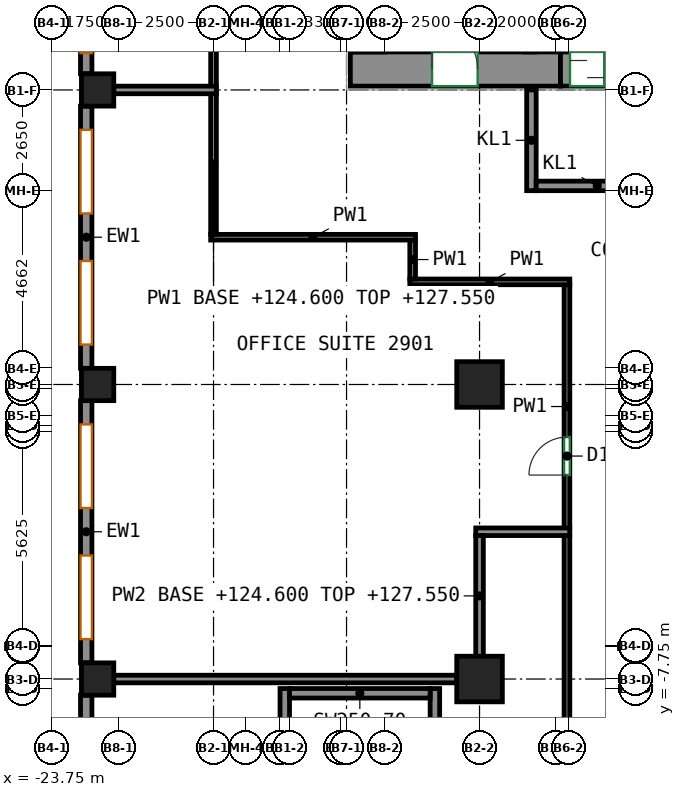
"""IFC4 building model, lengths in metres.
Left out: names, types, materials, properties, quantities, classifications, styles, units other than length and angle.
Written with IfcOpenShell. Run it as: python <this file> out.ifc"""

import sys

from ifc_helpers import new_model, si_unit, direction, frame, frame_2d, origin, origin_2d, place, context, subcontext, project, spatial, rectangle, extrude, source, transform, mapped, element, fill, save


model = new_model("IFC4")
c1 = context("Model", 3, precision=1e-05, world=origin(), true_north=direction((0.0, 1.0)))
c2 = subcontext(c1, "Body", "Model", "MODEL_VIEW")
j1 = project(units=[si_unit("LENGTHUNIT", "METRE"), si_unit("PLANEANGLEUNIT", "RADIAN")], contexts=[c1])
p1 = place(None, origin())
s1 = spatial("IfcSite", under=j1, at=p1, CompositionType="ELEMENT")
p2 = place(p1, origin())
s2 = spatial("IfcBuilding", under=s1, at=p2, CompositionType="ELEMENT")
p3 = place(p2, frame((0.0, 0.0, 124.6)))
s3 = spatial("IfcBuildingStorey", under=s2, at=p3, CompositionType="ELEMENT", Elevation=124.6)
m1 = source(origin(), c2, "Body", "SweptSolid", [
    extrude(rectangle(XDim=0.85, YDim=0.85, at=origin_2d()), origin(), (0.0, 0.0, 1.0), 3.6),
])
for number, where, z_axis, x_axis in (
    (1, (-22.55, -7.5, 0.0), (0.0, 0.0, 1.0), (1.0, 0.0, 0.0)),
    (2, (-22.55, 0.25, 0.0), (0.0, 0.0, 1.0), (1.0, 0.0, 0.0)),
    (3, (-22.55, 8.0, 0.0), (0.0, 0.0, 1.0), (1.0, 0.0, 0.0)),
):
    element("IfcColumn", number, at=place(p3, frame(where, z_axis=z_axis, x_axis=x_axis)), inside=s3, PredefinedType="COLUMN", context=c2, shape_type="MappedRepresentation", body=[
        mapped(m1, transform((0.0, 0.0, 0.0))),
    ])
m2 = source(origin(), c2, "Body", "SweptSolid", [
    extrude(rectangle(XDim=1.2, YDim=1.2, at=origin_2d()), origin(), (0.0, 0.0, 1.0), 3.6),
])
for number, where, z_axis, x_axis in (
    (4, (-12.5, -7.5, 0.0), (0.0, 0.0, 1.0), (1.0, 0.0, 0.0)),
    (5, (-12.5, 0.25, 0.0), (0.0, 0.0, 1.0), (1.0, 0.0, 0.0)),
):
    element("IfcColumn", number, at=place(p3, frame(where, z_axis=z_axis, x_axis=x_axis)), inside=s3, PredefinedType="COLUMN", context=c2, shape_type="MappedRepresentation", body=[
        mapped(m2, transform((0.0, 0.0, 0.0))),
    ])
m3 = source(origin(), c2, "Body", "SweptSolid", [
    extrude(rectangle(XDim=5.53, YDim=0.9, at=frame_2d((2.765, 0.0))), origin(), (0.0, 0.0, 1.0), 3.6),
])
p4 = place(p3, frame((-15.9, 8.55, 0.0), z_axis=(0.0, 0.0, 1.0), x_axis=(1.0, 0.0, 0.0)))
e6 = element("IfcWall", 6, at=p4, inside=s3, PredefinedType="SHEAR", context=c2, shape_type="MappedRepresentation", body=[
    mapped(m3, transform((0.0, 0.0, 0.0))),
])
p5 = place(p4, frame((2.15, 0.0, 0.0)))
e7 = element("IfcOpeningElement", 7, at=p5, cuts=e6, PredefinedType="OPENING", context=c2, shape_type="SweptSolid", body=[
    extrude(rectangle(XDim=1.2, YDim=2.1, at=frame_2d((0.6, 1.05))), frame((0.0, 0.46, 0.0), z_axis=(0.0, -1.0, 0.0), x_axis=(1.0, 0.0, 0.0)), (0.0, 0.0, 1.0), 0.92),
])
m4 = source(origin(), c2, "Body", "SweptSolid", [
    extrude(rectangle(XDim=8.0, YDim=0.25, at=frame_2d((4.0, 0.0))), origin(), (0.0, 0.0, 1.0), 3.6),
])
for number, where, z_axis, x_axis in (
    (8, (-17.625, -15.75, 0.0), (0.0, 0.0, 1.0), (0.0, 1.0, 0.0)),
    (9, (-13.675, -15.75, 0.0), (0.0, 0.0, 1.0), (0.0, 1.0, 0.0)),
):
    element("IfcWall", number, at=place(p3, frame(where, z_axis=z_axis, x_axis=x_axis)), inside=s3, PredefinedType="SHEAR", context=c2, shape_type="MappedRepresentation", body=[
        mapped(m4, transform((0.0, 0.0, 0.0))),
    ])
m5 = source(origin(), c2, "Body", "SweptSolid", [
    extrude(rectangle(XDim=3.7, YDim=0.25, at=frame_2d((1.85, 0.0))), origin(), (0.0, 0.0, 1.0), 3.6),
])
p6 = place(p3, frame((-17.5, -7.875, 0.0), z_axis=(0.0, 0.0, 1.0), x_axis=(1.0, 0.0, 0.0)))
e10 = element("IfcWall", 10, at=p6, inside=s3, PredefinedType="SHEAR", context=c2, shape_type="MappedRepresentation", body=[
    mapped(m5, transform((0.0, 0.0, 0.0))),
])
m6 = source(origin(), c2, "Body", "SweptSolid", [
    extrude(rectangle(XDim=13.15, YDim=0.3, at=frame_2d((6.575, 0.0))), origin(), (0.0, 0.0, 1.0), 3.6),
])
p7 = place(p3, frame((-22.85, 21.575, 0.0), z_axis=(0.0, 0.0, 1.0), x_axis=(0.0, -1.0, 0.0)))
e11 = element("IfcWall", 11, at=p7, inside=s3, PredefinedType="SOLIDWALL", context=c2, shape_type="MappedRepresentation", body=[
    mapped(m6, transform((0.0, 0.0, 0.0))),
])
p8 = place(p7, frame((0.544, 0.0, 0.7)))
e12 = element("IfcOpeningElement", 12, at=p8, cuts=e11, PredefinedType="OPENING", context=c2, shape_type="SweptSolid", body=[
    extrude(rectangle(XDim=2.2, YDim=2.25, at=frame_2d((1.1, 1.125))), frame((0.0, 0.16, 0.0), z_axis=(0.0, -1.0, 0.0), x_axis=(1.0, 0.0, 0.0)), (0.0, 0.0, 1.0), 0.32),
])
p9 = place(p7, frame((3.831, 0.0, 0.7)))
e13 = element("IfcOpeningElement", 13, at=p9, cuts=e11, PredefinedType="OPENING", context=c2, shape_type="SweptSolid", body=[
    extrude(rectangle(XDim=2.2, YDim=2.25, at=frame_2d((1.1, 1.125))), frame((0.0, 0.16, 0.0), z_axis=(0.0, -1.0, 0.0), x_axis=(1.0, 0.0, 0.0)), (0.0, 0.0, 1.0), 0.32),
])
p10 = place(p7, frame((7.119, 0.0, 0.7)))
e14 = element("IfcOpeningElement", 14, at=p10, cuts=e11, PredefinedType="OPENING", context=c2, shape_type="SweptSolid", body=[
    extrude(rectangle(XDim=2.2, YDim=2.25, at=frame_2d((1.1, 1.125))), frame((0.0, 0.16, 0.0), z_axis=(0.0, -1.0, 0.0), x_axis=(1.0, 0.0, 0.0)), (0.0, 0.0, 1.0), 0.32),
])
p11 = place(p7, frame((10.406, 0.0, 0.7)))
e15 = element("IfcOpeningElement", 15, at=p11, cuts=e11, PredefinedType="OPENING", context=c2, shape_type="SweptSolid", body=[
    extrude(rectangle(XDim=2.2, YDim=2.25, at=frame_2d((1.1, 1.125))), frame((0.0, 0.16, 0.0), z_axis=(0.0, -1.0, 0.0), x_axis=(1.0, 0.0, 0.0)), (0.0, 0.0, 1.0), 0.32),
])
m7 = source(origin(), c2, "Body", "SweptSolid", [
    extrude(rectangle(XDim=6.9, YDim=0.3, at=frame_2d((3.45, 0.0))), origin(), (0.0, 0.0, 1.0), 3.6),
])
p12 = place(p3, frame((-22.85, 7.575, 0.0), z_axis=(0.0, 0.0, 1.0), x_axis=(0.0, -1.0, 0.0)))
e16 = element("IfcWall", 16, at=p12, inside=s3, PredefinedType="SOLIDWALL", context=c2, shape_type="MappedRepresentation", body=[
    mapped(m7, transform((0.0, 0.0, 0.0))),
])
p13 = place(p12, frame((0.625, 0.0, 0.7)))
e17 = element("IfcOpeningElement", 17, at=p13, cuts=e16, PredefinedType="OPENING", context=c2, shape_type="SweptSolid", body=[
    extrude(rectangle(XDim=2.2, YDim=2.25, at=frame_2d((1.1, 1.125))), frame((0.0, 0.16, 0.0), z_axis=(0.0, -1.0, 0.0), x_axis=(1.0, 0.0, 0.0)), (0.0, 0.0, 1.0), 0.32),
])
p14 = place(p12, frame((4.075, 0.0, 0.7)))
e18 = element("IfcOpeningElement", 18, at=p14, cuts=e16, PredefinedType="OPENING", context=c2, shape_type="SweptSolid", body=[
    extrude(rectangle(XDim=2.2, YDim=2.25, at=frame_2d((1.1, 1.125))), frame((0.0, 0.16, 0.0), z_axis=(0.0, -1.0, 0.0), x_axis=(1.0, 0.0, 0.0)), (0.0, 0.0, 1.0), 0.32),
])
p15 = place(p3, frame((-22.85, -0.175, 0.0), z_axis=(0.0, 0.0, 1.0), x_axis=(0.0, -1.0, 0.0)))
e19 = element("IfcWall", 19, at=p15, inside=s3, PredefinedType="SOLIDWALL", context=c2, shape_type="MappedRepresentation", body=[
    mapped(m7, transform((0.0, 0.0, 0.0))),
])
p16 = place(p15, frame((0.625, 0.0, 0.7)))
e20 = element("IfcOpeningElement", 20, at=p16, cuts=e19, PredefinedType="OPENING", context=c2, shape_type="SweptSolid", body=[
    extrude(rectangle(XDim=2.2, YDim=2.25, at=frame_2d((1.1, 1.125))), frame((0.0, 0.16, 0.0), z_axis=(0.0, -1.0, 0.0), x_axis=(1.0, 0.0, 0.0)), (0.0, 0.0, 1.0), 0.32),
])
p17 = place(p15, frame((4.075, 0.0, 0.7)))
e21 = element("IfcOpeningElement", 21, at=p17, cuts=e19, PredefinedType="OPENING", context=c2, shape_type="SweptSolid", body=[
    extrude(rectangle(XDim=2.2, YDim=2.25, at=frame_2d((1.1, 1.125))), frame((0.0, 0.16, 0.0), z_axis=(0.0, -1.0, 0.0), x_axis=(1.0, 0.0, 0.0)), (0.0, 0.0, 1.0), 0.32),
])
m8 = source(origin(), c2, "Body", "SweptSolid", [
    extrude(rectangle(XDim=11.15, YDim=0.3, at=frame_2d((5.575, 0.0))), origin(), (0.0, 0.0, 1.0), 3.6),
])
p18 = place(p3, frame((-22.85, -7.925, 0.0), z_axis=(0.0, 0.0, 1.0), x_axis=(0.0, -1.0, 0.0)))
e22 = element("IfcWall", 22, at=p18, inside=s3, PredefinedType="SOLIDWALL", context=c2, shape_type="MappedRepresentation", body=[
    mapped(m8, transform((0.0, 0.0, 0.0))),
])
p19 = place(p18, frame((0.758, 0.0, 0.7)))
e23 = element("IfcOpeningElement", 23, at=p19, cuts=e22, PredefinedType="OPENING", context=c2, shape_type="SweptSolid", body=[
    extrude(rectangle(XDim=2.2, YDim=2.25, at=frame_2d((1.1, 1.125))), frame((0.0, 0.16, 0.0), z_axis=(0.0, -1.0, 0.0), x_axis=(1.0, 0.0, 0.0)), (0.0, 0.0, 1.0), 0.32),
])
p20 = place(p18, frame((4.475, 0.0, 0.7)))
e24 = element("IfcOpeningElement", 24, at=p20, cuts=e22, PredefinedType="OPENING", context=c2, shape_type="SweptSolid", body=[
    extrude(rectangle(XDim=2.2, YDim=2.25, at=frame_2d((1.1, 1.125))), frame((0.0, 0.16, 0.0), z_axis=(0.0, -1.0, 0.0), x_axis=(1.0, 0.0, 0.0)), (0.0, 0.0, 1.0), 0.32),
])
p21 = place(p18, frame((8.192, 0.0, 0.7)))
e25 = element("IfcOpeningElement", 25, at=p21, cuts=e22, PredefinedType="OPENING", context=c2, shape_type="SweptSolid", body=[
    extrude(rectangle(XDim=2.2, YDim=2.25, at=frame_2d((1.1, 1.125))), frame((0.0, 0.16, 0.0), z_axis=(0.0, -1.0, 0.0), x_axis=(1.0, 0.0, 0.0)), (0.0, 0.0, 1.0), 0.32),
])
m9 = source(origin(), c2, "Body", "SweptSolid", [
    extrude(rectangle(XDim=2.65, YDim=0.25, at=frame_2d((1.325, 0.0))), origin(), (0.0, 0.0, 1.0), 3.6),
])
p22 = place(p3, frame((-11.135, 5.35, 0.0), z_axis=(0.0, 0.0, 1.0), x_axis=(0.0, 1.0, 0.0)))
e26 = element("IfcWall", 26, at=p22, inside=s3, PredefinedType="PARTITIONING", context=c2, shape_type="MappedRepresentation", body=[
    mapped(m9, transform((0.0, 0.0, 0.0))),
])
m10 = source(origin(), c2, "Body", "SweptSolid", [
    extrude(rectangle(XDim=5.36, YDim=0.25, at=frame_2d((2.68, 0.0))), origin(), (0.0, 0.0, 1.0), 3.6),
])
p23 = place(p3, frame((-11.01, 5.475, 0.0), z_axis=(0.0, 0.0, 1.0), x_axis=(1.0, 0.0, 0.0)))
e27 = element("IfcWall", 27, at=p23, inside=s3, PredefinedType="PARTITIONING", context=c2, shape_type="MappedRepresentation", body=[
    mapped(m10, transform((0.0, 0.0, 0.0))),
])
p24 = place(p23, frame((2.28, 0.0, 0.0)))
e28 = element("IfcOpeningElement", 28, at=p24, cuts=e27, PredefinedType="OPENING", context=c2, shape_type="SweptSolid", body=[
    extrude(rectangle(XDim=0.8, YDim=2.0, at=frame_2d((0.4, 1.0))), frame((0.0, 0.135, 0.0), z_axis=(0.0, -1.0, 0.0), x_axis=(1.0, 0.0, 0.0)), (0.0, 0.0, 1.0), 0.27),
])
m11 = source(origin(), c2, "Body", "SweptSolid", [
    extrude(rectangle(XDim=1.4, YDim=0.9, at=frame_2d((0.7, 0.0))), origin(), (0.0, 0.0, 1.0), 2.7),
])
p25 = place(p3, frame((-10.37, 8.55, 0.0), z_axis=(0.0, 0.0, 1.0), x_axis=(1.0, 0.0, 0.0)))
e29 = element("IfcWall", 29, at=p25, inside=s3, PredefinedType="PARTITIONING", context=c2, shape_type="MappedRepresentation", body=[
    mapped(m11, transform((0.0, 0.0, 0.0))),
])
p26 = place(p25, frame((0.25, 0.0, 0.0)))
e30 = element("IfcOpeningElement", 30, at=p26, cuts=e29, PredefinedType="OPENING", context=c2, shape_type="SweptSolid", body=[
    extrude(rectangle(XDim=0.9, YDim=2.1, at=frame_2d((0.45, 1.05))), frame((0.0, 0.46, 0.0), z_axis=(0.0, -1.0, 0.0), x_axis=(1.0, 0.0, 0.0)), (0.0, 0.0, 1.0), 0.92),
])
p27 = place(p3, frame((-10.2, -3.535, 0.0), z_axis=(0.0, 0.0, 1.0), x_axis=(0.0, 1.0, 0.0)))
e31 = element("IfcWall", 31, at=p27, inside=s3, PredefinedType="PARTITIONING", context=c2, shape_type="SweptSolid", body=[
    extrude(rectangle(XDim=6.41, YDim=0.15, at=frame_2d((3.205, 0.0))), origin(), (0.0, 0.0, 1.0), 3.6),
])
p28 = place(p27, frame((1.402, 0.0, 0.0)))
e32 = element("IfcOpeningElement", 32, at=p28, cuts=e31, PredefinedType="OPENING", context=c2, shape_type="SweptSolid", body=[
    extrude(rectangle(XDim=1.0, YDim=2.1, at=frame_2d((0.5, 1.05))), frame((0.0, 0.085, 0.0), z_axis=(0.0, -1.0, 0.0), x_axis=(1.0, 0.0, 0.0)), (0.0, 0.0, 1.0), 0.17),
])
p29 = place(p3, frame((-14.335, 2.95, 0.0), z_axis=(0.0, 0.0, 1.0), x_axis=(1.0, 0.0, 0.0)))
e33 = element("IfcWall", 33, at=p29, inside=s3, PredefinedType="PARTITIONING", context=c2, shape_type="SweptSolid", body=[
    extrude(rectangle(XDim=4.21, YDim=0.15, at=frame_2d((2.105, 0.0))), origin(), (0.0, 0.0, 1.0), 3.6),
])
p30 = place(p3, frame((-14.26, 4.05, 0.0), z_axis=(0.0, 0.0, 1.0), x_axis=(0.0, -1.0, 0.0)))
e34 = element("IfcWall", 34, at=p30, inside=s3, PredefinedType="PARTITIONING", context=c2, shape_type="SweptSolid", body=[
    extrude(rectangle(XDim=1.025, YDim=0.15, at=frame_2d((0.513, 0.0))), origin(), (0.0, 0.0, 1.0), 3.6),
])
p31 = place(p3, frame((-19.575, 4.125, 0.0), z_axis=(0.0, 0.0, 1.0), x_axis=(1.0, 0.0, 0.0)))
e35 = element("IfcWall", 35, at=p31, inside=s3, PredefinedType="PARTITIONING", context=c2, shape_type="SweptSolid", body=[
    extrude(rectangle(XDim=5.39, YDim=0.15, at=frame_2d((2.695, 0.0))), origin(), (0.0, 0.0, 1.0), 3.6),
])
p32 = place(p3, frame((-19.5, 4.2, 0.0), z_axis=(0.0, 0.0, 1.0), x_axis=(0.0, 1.0, 0.0)))
e36 = element("IfcWall", 36, at=p32, inside=s3, PredefinedType="PARTITIONING", context=c2, shape_type="SweptSolid", body=[
    extrude(rectangle(XDim=3.71, YDim=0.15, at=frame_2d((1.855, 0.0))), origin(), (0.0, 0.0, 1.0), 2.95),
])
p33 = place(p3, frame((-10.2, -15.675, 0.0), z_axis=(0.0, 0.0, 1.0), x_axis=(0.0, 1.0, 0.0)))
e37 = element("IfcWall", 37, at=p33, inside=s3, PredefinedType="PARTITIONING", context=c2, shape_type="SweptSolid", body=[
    extrude(rectangle(XDim=11.96, YDim=0.15, at=frame_2d((5.98, 0.0))), origin(), (0.0, 0.0, 1.0), 3.6),
])
p34 = place(p33, frame((3.016, 0.0, 0.0)))
e38 = element("IfcOpeningElement", 38, at=p34, cuts=e37, PredefinedType="OPENING", context=c2, shape_type="SweptSolid", body=[
    extrude(rectangle(XDim=1.0, YDim=2.1, at=frame_2d((0.5, 1.05))), frame((0.0, 0.085, 0.0), z_axis=(0.0, -1.0, 0.0), x_axis=(1.0, 0.0, 0.0)), (0.0, 0.0, 1.0), 0.17),
])
p35 = place(p3, frame((-19.5, 8.09, 0.0), z_axis=(0.0, 0.0, 1.0), x_axis=(0.0, 1.0, 0.0)))
e39 = element("IfcWall", 39, at=p35, inside=s3, PredefinedType="PARTITIONING", context=c2, shape_type="SweptSolid", body=[
    extrude(rectangle(XDim=13.82, YDim=0.15, at=frame_2d((6.91, 0.0))), origin(), (0.0, 0.0, 1.0), 2.95),
])
p36 = place(p35, frame((9.815, 0.0, 0.0)))
e40 = element("IfcOpeningElement", 40, at=p36, cuts=e39, PredefinedType="OPENING", context=c2, shape_type="SweptSolid", body=[
    extrude(rectangle(XDim=0.9, YDim=2.1, at=frame_2d((0.45, 1.05))), frame((0.0, 0.085, 0.0), z_axis=(0.0, -1.0, 0.0), x_axis=(1.0, 0.0, 0.0)), (0.0, 0.0, 1.0), 0.17),
])
p37 = place(p3, frame((-12.6, -3.625, 0.0), z_axis=(0.0, 0.0, 1.0), x_axis=(1.0, 0.0, 0.0)))
e41 = element("IfcWall", 41, at=p37, inside=s3, PredefinedType="PARTITIONING", context=c2, shape_type="SweptSolid", body=[
    extrude(rectangle(XDim=2.474, YDim=0.2, at=frame_2d((1.237, 0.0))), origin(), (0.0, 0.0, 1.0), 3.6),
])
p38 = place(p3, frame((-12.5, -6.9, 0.0), z_axis=(0.0, 0.0, 1.0), x_axis=(0.0, 1.0, 0.0)))
e42 = element("IfcWall", 42, at=p38, inside=s3, PredefinedType="PARTITIONING", context=c2, shape_type="SweptSolid", body=[
    extrude(rectangle(XDim=3.175, YDim=0.2, at=frame_2d((1.587, 0.0))), origin(), (0.0, 0.0, 1.0), 2.95),
])
p39 = place(p3, frame((-22.125, -7.5, 0.0), z_axis=(0.0, 0.0, 1.0), x_axis=(1.0, 0.0, 0.0)))
e43 = element("IfcWall", 43, at=p39, inside=s3, PredefinedType="PARTITIONING", context=c2, shape_type="SweptSolid", body=[
    extrude(rectangle(XDim=9.025, YDim=0.2, at=frame_2d((4.512, 0.0))), origin(), (0.0, 0.0, 1.0), 3.6),
])
p40 = place(p3, frame((-22.125, 8.0, 0.0), z_axis=(0.0, 0.0, 1.0), x_axis=(1.0, 0.0, 0.0)))
e44 = element("IfcWall", 44, at=p40, inside=s3, PredefinedType="PARTITIONING", context=c2, shape_type="SweptSolid", body=[
    extrude(rectangle(XDim=2.699, YDim=0.2, at=frame_2d((1.35, 0.0))), origin(), (0.0, 0.0, 1.0), 3.6),
])
p41 = place(p11, origin())
e45 = element("IfcWindow", 45, at=p41, inside=s3, PartitioningType="SINGLE_PANEL", PredefinedType="WINDOW", context=c2, shape_type="SweptSolid", body=[
    extrude(rectangle(XDim=2.2, YDim=2.25, at=frame_2d((1.1, 1.125))), frame((0.0, 0.03, 0.0), z_axis=(0.0, -1.0, 0.0), x_axis=(1.0, 0.0, 0.0)), (0.0, 0.0, 1.0), 0.06),
])
fill(e15, e45)
p42 = place(p13, origin())
e46 = element("IfcWindow", 46, at=p42, inside=s3, PartitioningType="SINGLE_PANEL", PredefinedType="WINDOW", context=c2, shape_type="SweptSolid", body=[
    extrude(rectangle(XDim=2.2, YDim=2.25, at=frame_2d((1.1, 1.125))), frame((0.0, 0.03, 0.0), z_axis=(0.0, -1.0, 0.0), x_axis=(1.0, 0.0, 0.0)), (0.0, 0.0, 1.0), 0.06),
])
fill(e17, e46)
p43 = place(p14, origin())
e47 = element("IfcWindow", 47, at=p43, inside=s3, PartitioningType="SINGLE_PANEL", PredefinedType="WINDOW", context=c2, shape_type="SweptSolid", body=[
    extrude(rectangle(XDim=2.2, YDim=2.25, at=frame_2d((1.1, 1.125))), frame((0.0, 0.03, 0.0), z_axis=(0.0, -1.0, 0.0), x_axis=(1.0, 0.0, 0.0)), (0.0, 0.0, 1.0), 0.06),
])
fill(e18, e47)
p44 = place(p16, origin())
e48 = element("IfcWindow", 48, at=p44, inside=s3, PartitioningType="SINGLE_PANEL", PredefinedType="WINDOW", context=c2, shape_type="SweptSolid", body=[
    extrude(rectangle(XDim=2.2, YDim=2.25, at=frame_2d((1.1, 1.125))), frame((0.0, 0.03, 0.0), z_axis=(0.0, -1.0, 0.0), x_axis=(1.0, 0.0, 0.0)), (0.0, 0.0, 1.0), 0.06),
])
fill(e20, e48)
p45 = place(p17, origin())
e49 = element("IfcWindow", 49, at=p45, inside=s3, PartitioningType="SINGLE_PANEL", PredefinedType="WINDOW", context=c2, shape_type="SweptSolid", body=[
    extrude(rectangle(XDim=2.2, YDim=2.25, at=frame_2d((1.1, 1.125))), frame((0.0, 0.03, 0.0), z_axis=(0.0, -1.0, 0.0), x_axis=(1.0, 0.0, 0.0)), (0.0, 0.0, 1.0), 0.06),
])
fill(e21, e49)
p46 = place(p26, origin())
e50 = element("IfcDoor", 50, at=p46, inside=s3, OperationType="SLIDING_TO_LEFT", PredefinedType="DOOR", context=c2, shape_type="SweptSolid", body=[
    extrude(rectangle(XDim=0.9, YDim=2.1, at=frame_2d((0.45, 1.05))), frame((0.0, 0.355, 0.0), z_axis=(0.0, -1.0, 0.0), x_axis=(1.0, 0.0, 0.0)), (0.0, 0.0, 1.0), 0.05),
])
fill(e30, e50)
p47 = place(p5, origin())
e51 = element("IfcDoor", 51, at=p47, inside=s3, OperationType="DOUBLE_DOOR_SINGLE_SWING", PredefinedType="DOOR", context=c2, shape_type="SweptSolid", body=[
    extrude(rectangle(XDim=1.2, YDim=2.1, at=frame_2d((0.6, 1.05))), frame((0.0, 0.355, 0.0), z_axis=(0.0, -1.0, 0.0), x_axis=(1.0, 0.0, 0.0)), (0.0, 0.0, 1.0), 0.05),
])
fill(e7, e51)
p48 = place(p28, origin())
e52 = element("IfcDoor", 52, at=p48, inside=s3, OperationType="SINGLE_SWING_LEFT", PredefinedType="DOOR", context=c2, shape_type="SweptSolid", body=[
    extrude(rectangle(XDim=1.0, YDim=2.1, at=frame_2d((0.5, 1.05))), frame((0.0, 0.025, 0.0), z_axis=(0.0, -1.0, 0.0), x_axis=(1.0, 0.0, 0.0)), (0.0, 0.0, 1.0), 0.05),
])
fill(e32, e52)
save(model, sys.argv[1])
